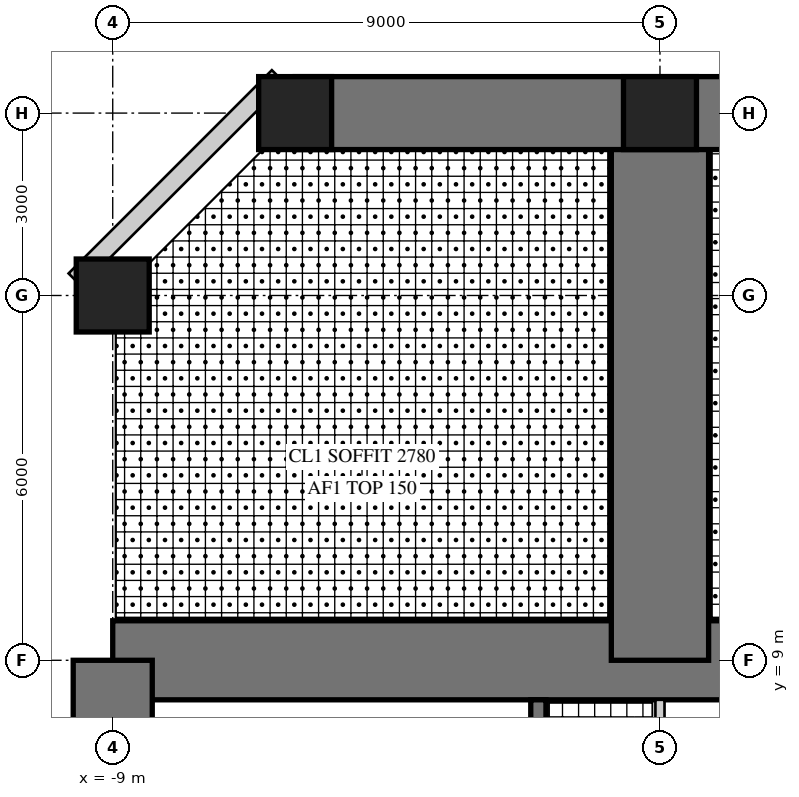
"""IFC4 building model, lengths in metres.
Left out: names, types, materials, properties, quantities, classifications, styles, units other than length and angle.
Written with IfcOpenShell. Run it as: python <this file> out.ifc"""

import sys

from ifc_helpers import new_model, si_unit, direction, frame, frame_2d, origin, origin_2d, place, context, subcontext, project, spatial, rectangle, hollow_rectangle, extrude, element, fill, save


model = new_model("IFC4")
c1 = context("Model", 3, precision=1e-05, world=origin(), true_north=direction((0.0, 1.0)))
c2 = subcontext(c1, "Body", "Model", "MODEL_VIEW")
j1 = project(units=[si_unit("LENGTHUNIT", "METRE"), si_unit("PLANEANGLEUNIT", "RADIAN")], contexts=[c1])
p1 = place(None, origin())
s1 = spatial("IfcSite", under=j1, at=p1, CompositionType="ELEMENT")
p2 = place(p1, origin())
s2 = spatial("IfcBuilding", under=s1, at=p2, CompositionType="ELEMENT")
p3 = place(p2, frame((0.0, 0.0, 104.5)))
s3 = spatial("IfcBuildingStorey", under=s2, at=p3, CompositionType="ELEMENT", Elevation=104.5)
p4 = place(p3, frame((9.0, 9.0, 0.0), z_axis=(0.0, 0.0, 1.0), x_axis=(-1.0, 0.0, 0.0)))
e1 = element("IfcWall", 1, at=p4, inside=s3, PredefinedType="SHEAR", context=c2, shape_type="SweptSolid", body=[
    extrude(rectangle(XDim=18.0, YDim=1.3, at=frame_2d((9.0, 0.0))), origin(), (0.0, 0.0, 1.0), 4.0),
])
p5 = place(p4, frame((9.8, 0.0, 0.0)))
e2 = element("IfcOpeningElement", 2, at=p5, cuts=e1, PredefinedType="OPENING", context=c2, shape_type="SweptSolid", body=[
    extrude(rectangle(XDim=1.0, YDim=2.4, at=frame_2d((0.5, 1.2))), frame((0.0, 0.66, 0.0), z_axis=(0.0, -1.0, 0.0), x_axis=(1.0, 0.0, 0.0)), (0.0, 0.0, 1.0), 1.32),
])
p6 = place(p3, frame((-9.0, 9.0, 0.0), z_axis=(0.0, 0.0, 1.0), x_axis=(0.0, -1.0, 0.0)))
e3 = element("IfcWall", 3, at=p6, inside=s3, PredefinedType="SHEAR", context=c2, shape_type="SweptSolid", body=[
    extrude(rectangle(XDim=18.0, YDim=1.3, at=frame_2d((9.0, 0.0))), origin(), (0.0, 0.0, 1.0), 4.0),
])
p7 = place(p6, frame((9.8, 0.0, 0.0)))
e4 = element("IfcOpeningElement", 4, at=p7, cuts=e3, PredefinedType="OPENING", context=c2, shape_type="SweptSolid", body=[
    extrude(rectangle(XDim=1.0, YDim=2.4, at=frame_2d((0.5, 1.2))), frame((0.0, 0.66, 0.0), z_axis=(0.0, -1.0, 0.0), x_axis=(1.0, 0.0, 0.0)), (0.0, 0.0, 1.0), 1.32),
])
p8 = place(p3, frame((-2.0, 1.675, 0.0), z_axis=(0.0, 0.0, 1.0), x_axis=(0.0, 1.0, 0.0)))
e5 = element("IfcWall", 5, at=p8, inside=s3, PredefinedType="SHEAR", context=c2, shape_type="SweptSolid", body=[
    extrude(rectangle(XDim=6.675, YDim=0.25, at=frame_2d((3.337, 0.0))), origin(), (0.0, 0.0, 1.0), 4.0),
])
p9 = place(p8, frame((0.725, 0.0, 0.0)))
e6 = element("IfcOpeningElement", 6, at=p9, cuts=e5, PredefinedType="OPENING", context=c2, shape_type="SweptSolid", body=[
    extrude(rectangle(XDim=1.0, YDim=2.1, at=frame_2d((0.5, 1.05))), frame((0.0, 0.135, 0.0), z_axis=(0.0, -1.0, 0.0), x_axis=(1.0, 0.0, 0.0)), (0.0, 0.0, 1.0), 0.27),
])
p10 = place(p3, frame((0.0, 9.0, 0.0), z_axis=(0.0, 0.0, 1.0), x_axis=(0.0, 1.0, 0.0)))
e7 = element("IfcWall", 7, at=p10, inside=s3, PredefinedType="SHEAR", context=c2, shape_type="SweptSolid", body=[
    extrude(rectangle(XDim=9.0, YDim=1.6, at=frame_2d((4.5, 0.0))), origin(), (0.0, 0.0, 1.0), 4.0),
])
p11 = place(p10, frame((4.3, 0.0, 0.0)))
e8 = element("IfcOpeningElement", 8, at=p11, cuts=e7, PredefinedType="OPENING", context=c2, shape_type="SweptSolid", body=[
    extrude(rectangle(XDim=1.0, YDim=2.2, at=frame_2d((0.5, 1.1))), frame((0.0, 0.81, 0.0), z_axis=(0.0, -1.0, 0.0), x_axis=(1.0, 0.0, 0.0)), (0.0, 0.0, 1.0), 1.62),
])
p12 = place(p3, frame((6.0, 18.0, 0.0), z_axis=(0.0, 0.0, 1.0), x_axis=(-1.0, 0.0, 0.0)))
e9 = element("IfcWall", 9, at=p12, inside=s3, PredefinedType="SHEAR", context=c2, shape_type="SweptSolid", body=[
    extrude(rectangle(XDim=12.0, YDim=1.2, at=frame_2d((6.0, 0.0))), origin(), (0.0, 0.0, 1.0), 4.0),
])
p13 = place(p12, frame((1.5, 0.0, 0.6)))
e10 = element("IfcOpeningElement", 10, at=p13, cuts=e9, PredefinedType="OPENING", context=c2, shape_type="SweptSolid", body=[
    extrude(rectangle(XDim=3.0, YDim=2.4, at=frame_2d((1.5, 1.2))), frame((0.0, 0.61, 0.0), z_axis=(0.0, -1.0, 0.0), x_axis=(1.0, 0.0, 0.0)), (0.0, 0.0, 1.0), 1.22),
])
p14 = place(p12, frame((7.5, 0.0, 0.6)))
e11 = element("IfcOpeningElement", 11, at=p14, cuts=e9, PredefinedType="OPENING", context=c2, shape_type="SweptSolid", body=[
    extrude(rectangle(XDim=3.0, YDim=2.4, at=frame_2d((1.5, 1.2))), frame((0.0, 0.61, 0.0), z_axis=(0.0, -1.0, 0.0), x_axis=(1.0, 0.0, 0.0)), (0.0, 0.0, 1.0), 1.22),
])
for number, where, z_axis, x_axis in (
    (12, (-9.0, 15.0, 0.0), (0.0, 0.0, 1.0), (1.0, 0.0, 0.0)),
    (13, (0.0, 18.0, 0.0), (0.0, 0.0, 1.0), (1.0, 0.0, 0.0)),
    (14, (-6.0, 18.0, 0.0), (0.0, 0.0, 1.0), (1.0, 0.0, 0.0)),
):
    element("IfcColumn", number, at=place(p3, frame(where, z_axis=z_axis, x_axis=x_axis)), inside=s3, PredefinedType="COLUMN", context=c2, shape_type="SweptSolid", body=[
        extrude(rectangle(XDim=1.2, YDim=1.2, at=origin_2d()), origin(), (0.0, 0.0, 1.0), 4.0),
    ])
p15 = place(p3, frame((-6.277, 18.6, 0.0), z_axis=(0.0, 0.0, 1.0), x_axis=(-0.707106781187, -0.707106781187, 0.0)))
e15 = element("IfcWall", 15, at=p15, inside=s3, PredefinedType="SOLIDWALL", context=c2, shape_type="SweptSolid", body=[
    extrude(rectangle(XDim=4.728, YDim=0.3, at=frame_2d((2.364, 0.0))), origin(), (0.0, 0.0, 1.0), 3.8),
])
p16 = place(p15, frame((1.914, 0.0, 0.3)))
e16 = element("IfcOpeningElement", 16, at=p16, cuts=e15, PredefinedType="OPENING", context=c2, shape_type="SweptSolid", body=[
    extrude(rectangle(XDim=0.9, YDim=2.4, at=frame_2d((0.45, 1.2))), frame((0.0, 0.16, 0.0), z_axis=(0.0, -1.0, 0.0), x_axis=(1.0, 0.0, 0.0)), (0.0, 0.0, 1.0), 0.32),
])
p17 = place(p3, frame((0.0, 5.675, 0.0), z_axis=(0.0, 0.0, 1.0), x_axis=(0.0, 1.0, 0.0)))
e17 = element("IfcWall", 17, at=p17, inside=s3, PredefinedType="PARTITIONING", context=c2, shape_type="SweptSolid", body=[
    extrude(rectangle(XDim=2.675, YDim=0.15, at=frame_2d((1.337, 0.0))), origin(), (0.0, 0.0, 1.0), 3.8),
])
p18 = place(p17, frame((0.4, 0.0, 0.0)))
e18 = element("IfcOpeningElement", 18, at=p18, cuts=e17, PredefinedType="OPENING", context=c2, shape_type="SweptSolid", body=[
    extrude(rectangle(XDim=1.0, YDim=2.1, at=frame_2d((0.5, 1.05))), frame((0.0, 0.085, 0.0), z_axis=(0.0, -1.0, 0.0), x_axis=(1.0, 0.0, 0.0)), (0.0, 0.0, 1.0), 0.17),
])
p19 = place(p14, origin())
e19 = element("IfcWindow", 19, at=p19, inside=s3, PartitioningType="SINGLE_PANEL", PredefinedType="WINDOW", context=c2, shape_type="SweptSolid", body=[
    extrude(hollow_rectangle(XDim=3.0, YDim=2.4, WallThickness=0.06, at=frame_2d((1.5, 1.2))), frame((0.0, 0.03, 0.0), z_axis=(0.0, -1.0, 0.0), x_axis=(1.0, 0.0, 0.0)), (0.0, 0.0, 1.0), 0.06),
    extrude(rectangle(XDim=2.879, YDim=2.279, at=frame_2d((1.5, 1.2))), frame((0.0, 0.03, 0.0), z_axis=(0.0, -1.0, 0.0), x_axis=(1.0, 0.0, 0.0)), (0.0, 0.0, 1.0), 0.06),
])
fill(e11, e19)
p20 = place(p16, origin())
e20 = element("IfcWindow", 20, at=p20, inside=s3, PartitioningType="SINGLE_PANEL", PredefinedType="WINDOW", context=c2, shape_type="SweptSolid", body=[
    extrude(hollow_rectangle(XDim=0.9, YDim=2.4, WallThickness=0.06, at=frame_2d((0.45, 1.2))), frame((0.0, 0.03, 0.0), z_axis=(0.0, -1.0, 0.0), x_axis=(1.0, 0.0, 0.0)), (0.0, 0.0, 1.0), 0.06),
    extrude(rectangle(XDim=0.779, YDim=2.279, at=frame_2d((0.45, 1.2))), frame((0.0, 0.03, 0.0), z_axis=(0.0, -1.0, 0.0), x_axis=(1.0, 0.0, 0.0)), (0.0, 0.0, 1.0), 0.06),
])
fill(e16, e20)
p21 = place(p11, frame((1.0, 0.0, 0.0), z_axis=(0.0, 0.0, 1.0), x_axis=(-1.0, 0.0, 0.0)))
e21 = element("IfcDoor", 21, at=p21, inside=s3, OperationType="SINGLE_SWING_LEFT", PredefinedType="DOOR", context=c2, shape_type="SweptSolid", body=[
    extrude(rectangle(XDim=1.0, YDim=2.2, at=frame_2d((0.5, 1.1))), frame((0.0, 0.025, 0.0), z_axis=(0.0, -1.0, 0.0), x_axis=(1.0, 0.0, 0.0)), (0.0, 0.0, 1.0), 0.05),
])
fill(e8, e21)
p22 = place(p5, frame((1.0, 0.0, 0.0), z_axis=(0.0, 0.0, 1.0), x_axis=(-1.0, 0.0, 0.0)))
e22 = element("IfcDoor", 22, at=p22, inside=s3, OperationType="SINGLE_SWING_RIGHT", PredefinedType="DOOR", context=c2, shape_type="SweptSolid", body=[
    extrude(rectangle(XDim=1.0, YDim=2.4, at=frame_2d((0.5, 1.2))), frame((0.0, -0.005, 0.0), z_axis=(0.0, -1.0, 0.0), x_axis=(1.0, 0.0, 0.0)), (0.0, 0.0, 1.0), 0.05),
])
fill(e2, e22)
save(model, sys.argv[1])
